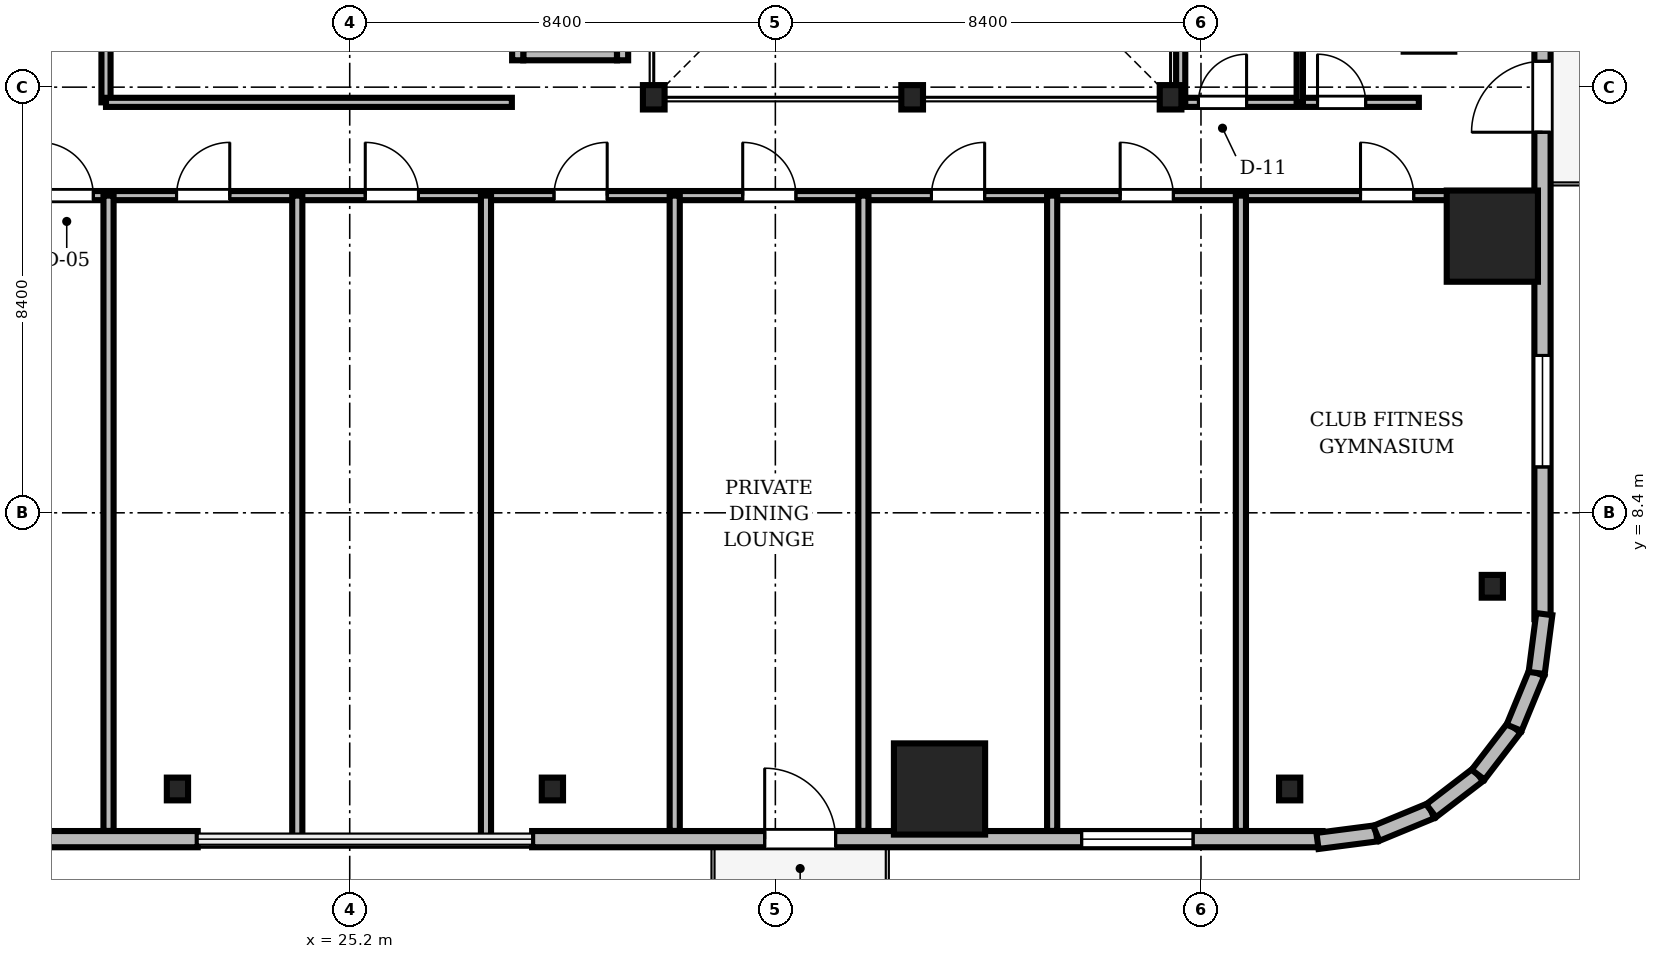
"""IFC4 building model, lengths in metres.
Left out: names, types, materials, properties, quantities, classifications, styles, units other than length and angle.
Written with IfcOpenShell. Run it as: python <this file> out.ifc"""

import sys

from ifc_helpers import new_model, si_unit, direction, frame, frame_2d, origin, origin_2d, place, context, subcontext, project, spatial, rectangle, i_section, extrude, source, transform, mapped, element, fill, save


model = new_model("IFC4")
c1 = context("Model", 3, precision=1e-05, world=origin(), true_north=direction((0.0, 1.0)))
c2 = subcontext(c1, "Body", "Model", "MODEL_VIEW")
j1 = project(units=[si_unit("LENGTHUNIT", "METRE"), si_unit("PLANEANGLEUNIT", "RADIAN")], contexts=[c1])
p1 = place(None, origin())
s1 = spatial("IfcSite", under=j1, at=p1, CompositionType="ELEMENT")
p2 = place(p1, origin())
s2 = spatial("IfcBuilding", under=s1, at=p2, CompositionType="ELEMENT")
p3 = place(p2, frame((0.0, 0.0, 89.65)))
s3 = spatial("IfcBuildingStorey", under=s2, at=p3, CompositionType="ELEMENT", Elevation=89.65)
m1 = source(origin(), c2, "Body", "SweptSolid", [
    extrude(i_section(OverallWidth=0.428, OverallDepth=0.481, WebThickness=0.04, FlangeThickness=0.063, FilletRadius=0.015, at=origin_2d()), origin(), (0.0, 0.0, 1.0), 3.0),
])
for number, where, z_axis, x_axis in (
    (1, (31.2, 16.6, 0.0), (0.0, 0.0, 1.0), (1.0, 0.0, 0.0)),
    (2, (36.3, 16.6, 0.0), (0.0, 0.0, 1.0), (1.0, 0.0, 0.0)),
    (3, (41.4, 16.6, 0.0), (0.0, 0.0, 1.0), (1.0, 0.0, 0.0)),
):
    element("IfcColumn", number, at=place(p3, frame(where, z_axis=z_axis, x_axis=x_axis)), inside=s3, PredefinedType="COLUMN", context=c2, shape_type="MappedRepresentation", body=[
        mapped(m1, transform((0.0, 0.0, 0.0), scale=1.0)),
    ])
m2 = source(origin(), c2, "Body", "SweptSolid", [
    extrude(rectangle(XDim=1.8, YDim=1.8, at=origin_2d()), origin(), (0.0, 0.0, 1.0), 3.0),
])
for number, where, z_axis, x_axis in (
    (4, (36.84, 2.95, 0.0), (0.0, 0.0, 1.0), (1.0, 0.0, 0.0)),
    (5, (47.75, 13.86, 0.0), (0.0, 0.0, 1.0), (1.0, 0.0, 0.0)),
):
    element("IfcColumn", number, at=place(p3, frame(where, z_axis=z_axis, x_axis=x_axis)), inside=s3, PredefinedType="COLUMN", context=c2, shape_type="MappedRepresentation", body=[
        mapped(m2, transform((0.0, 0.0, 0.0), scale=1.0)),
    ])
m3 = source(origin(), c2, "Body", "SweptSolid", [
    extrude(i_section(OverallWidth=0.419, OverallDepth=0.449, WebThickness=0.031, FlangeThickness=0.048, FilletRadius=0.015, at=origin_2d()), origin(), (0.0, 0.0, 1.0), 3.0),
])
for number, where, z_axis, x_axis in (
    (6, (21.8, 2.95, 0.0), (0.0, 0.0, 1.0), (1.0, 0.0, 0.0)),
    (7, (29.2, 2.95, 0.0), (0.0, 0.0, 1.0), (1.0, 0.0, 0.0)),
    (8, (43.75, 2.95, 0.0), (0.0, 0.0, 1.0), (1.0, 0.0, 0.0)),
    (9, (47.75, 6.95, 0.0), (0.0, 0.0, 1.0), (1.0, 0.0, 0.0)),
):
    element("IfcColumn", number, at=place(p3, frame(where, z_axis=z_axis, x_axis=x_axis)), inside=s3, PredefinedType="COLUMN", context=c2, shape_type="MappedRepresentation", body=[
        mapped(m3, transform((0.0, 0.0, 0.0), scale=1.0)),
    ])
m4 = source(origin(), c2, "Body", "SweptSolid", [
    extrude(rectangle(XDim=15.6, YDim=0.32, at=frame_2d((7.8, 0.0))), origin(), (0.0, 0.0, 1.0), 3.0),
])
p4 = place(p3, frame((6.6, 1.96, 0.0), z_axis=(0.0, 0.0, 1.0), x_axis=(1.0, 0.0, 0.0)))
e10 = element("IfcWall", 10, at=p4, inside=s3, PredefinedType="SOLIDWALL", context=c2, shape_type="MappedRepresentation", body=[
    mapped(m4, transform((0.0, 0.0, 0.0), scale=1.0)),
])
m5 = source(origin(), c2, "Body", "SweptSolid", [
    extrude(rectangle(XDim=2.2, YDim=2.4, at=frame_2d((1.1, 1.2))), frame((0.0, 0.17, 0.0), z_axis=(0.0, -1.0, 0.0), x_axis=(1.0, 0.0, 0.0)), (0.0, 0.0, 1.0), 0.34),
])
p5 = place(p4, frame((3.005, 0.0, 0.35)))
e11 = element("IfcOpeningElement", 11, at=p5, cuts=e10, PredefinedType="OPENING", context=c2, shape_type="MappedRepresentation", body=[
    mapped(m5, transform((0.0, 0.0, 0.0), scale=1.0)),
])
p6 = place(p3, frame((28.8, 1.96, 0.0), z_axis=(0.0, 0.0, 1.0), x_axis=(1.0, 0.0, 0.0)))
e12 = element("IfcWall", 12, at=p6, inside=s3, PredefinedType="SOLIDWALL", context=c2, shape_type="MappedRepresentation", body=[
    mapped(m4, transform((0.0, 0.0, 0.0), scale=1.0)),
])
m6 = source(origin(), c2, "Body", "SweptSolid", [
    extrude(rectangle(XDim=1.4, YDim=2.3, at=frame_2d((0.7, 1.15))), frame((0.0, 0.17, 0.0), z_axis=(0.0, -1.0, 0.0), x_axis=(1.0, 0.0, 0.0)), (0.0, 0.0, 1.0), 0.34),
])
p7 = place(p6, frame((4.59, 0.0, 0.0)))
e13 = element("IfcOpeningElement", 13, at=p7, cuts=e12, PredefinedType="OPENING", context=c2, shape_type="MappedRepresentation", body=[
    mapped(m6, transform((0.0, 0.0, 0.0), scale=1.0)),
])
p8 = place(p6, frame((10.845, 0.0, 0.35)))
e14 = element("IfcOpeningElement", 14, at=p8, cuts=e12, PredefinedType="OPENING", context=c2, shape_type="MappedRepresentation", body=[
    mapped(m5, transform((0.0, 0.0, 0.0), scale=1.0)),
])
p9 = place(p3, frame((48.74, 6.3, 0.0), z_axis=(0.0, 0.0, 1.0), x_axis=(0.0, 1.0, 0.0)))
e15 = element("IfcWall", 15, at=p9, inside=s3, PredefinedType="SOLIDWALL", context=c2, shape_type="MappedRepresentation", body=[
    mapped(m4, transform((0.0, 0.0, 0.0), scale=1.0)),
])
p10 = place(p9, frame((9.61, 0.0, 0.0)))
e16 = element("IfcOpeningElement", 16, at=p10, cuts=e15, PredefinedType="OPENING", context=c2, shape_type="MappedRepresentation", body=[
    mapped(m6, transform((0.0, 0.0, 0.0), scale=1.0)),
])
p11 = place(p9, frame((3.005, 0.0, 0.35)))
e17 = element("IfcOpeningElement", 17, at=p11, cuts=e15, PredefinedType="OPENING", context=c2, shape_type="MappedRepresentation", body=[
    mapped(m5, transform((0.0, 0.0, 0.0), scale=1.0)),
])
m7 = source(origin(), c2, "Body", "SweptSolid", [
    extrude(rectangle(XDim=1.17, YDim=0.32, at=frame_2d((0.585, 0.0))), origin(), (0.0, 0.0, 1.0), 3.0),
])
p12 = place(p3, frame((44.3, 1.925, 0.0), z_axis=(0.0, 0.0, 1.0), x_axis=(0.991762485493, 0.128090485085, 0.0)))
e18 = element("IfcWall", 18, at=p12, inside=s3, PredefinedType="SOLIDWALL", context=c2, shape_type="MappedRepresentation", body=[
    mapped(m7, transform((0.0, 0.0, 0.0), scale=1.0)),
])
m8 = source(origin(), c2, "Body", "SweptSolid", [
    extrude(rectangle(XDim=1.169, YDim=0.32, at=frame_2d((0.585, 0.0))), origin(), (0.0, 0.0, 1.0), 3.0),
])
p13 = place(p3, frame((45.46, 2.074, 0.0), z_axis=(0.0, 0.0, 1.0), x_axis=(0.924479075121, 0.381232789334, 0.0)))
e19 = element("IfcWall", 19, at=p13, inside=s3, PredefinedType="SOLIDWALL", context=c2, shape_type="MappedRepresentation", body=[
    mapped(m8, transform((0.0, 0.0, 0.0), scale=1.0)),
])
m9 = source(origin(), c2, "Body", "SweptSolid", [
    extrude(rectangle(XDim=1.169, YDim=0.32, at=frame_2d((0.584, 0.0))), origin(), (0.0, 0.0, 1.0), 3.0),
])
p14 = place(p3, frame((46.541, 2.52, 0.0), z_axis=(0.0, 0.0, 1.0), x_axis=(0.793663520347, 0.608356981114, 0.0)))
e20 = element("IfcWall", 20, at=p14, inside=s3, PredefinedType="SOLIDWALL", context=c2, shape_type="MappedRepresentation", body=[
    mapped(m9, transform((0.0, 0.0, 0.0), scale=1.0)),
])
m10 = source(origin(), c2, "Body", "SweptSolid", [
    extrude(rectangle(XDim=1.169, YDim=0.32, at=frame_2d((0.584, 0.0))), origin(), (0.0, 0.0, 1.0), 3.0),
])
for number, where, z_axis, x_axis in (
    (21, (47.469, 3.231, 0.0), (0.0, 0.0, 1.0), (0.608, 0.794, 0.0)),
    (22, (48.18, 4.159, 0.0), (0.0, 0.0, 1.0), (0.381, 0.925, 0.0)),
):
    element("IfcWall", number, at=place(p3, frame(where, z_axis=z_axis, x_axis=x_axis)), inside=s3, PredefinedType="SOLIDWALL", context=c2, shape_type="MappedRepresentation", body=[
        mapped(m10, transform((0.0, 0.0, 0.0), scale=1.0)),
    ])
m11 = source(origin(), c2, "Body", "SweptSolid", [
    extrude(rectangle(XDim=1.171, YDim=0.32, at=frame_2d((0.585, 0.0))), origin(), (0.0, 0.0, 1.0), 3.0),
])
p15 = place(p3, frame((48.625, 5.24, 0.0), z_axis=(0.0, 0.0, 1.0), x_axis=(0.128269133229, 0.991739395941, 0.0)))
e23 = element("IfcWall", 23, at=p15, inside=s3, PredefinedType="SOLIDWALL", context=c2, shape_type="MappedRepresentation", body=[
    mapped(m11, transform((0.0, 0.0, 0.0), scale=1.0)),
])
m12 = source(origin(), c2, "Body", "SweptSolid", [
    extrude(rectangle(XDim=1.85, YDim=0.22, at=frame_2d((0.925, 0.0))), origin(), (0.0, 0.0, 1.0), 3.0),
])
p16 = place(p3, frame((28.625, 17.44, 0.0), z_axis=(0.0, 0.0, 1.0), x_axis=(1.0, 0.0, 0.0)))
e24 = element("IfcWall", 24, at=p16, inside=s3, PredefinedType="SOLIDWALL", context=c2, shape_type="MappedRepresentation", body=[
    mapped(m12, transform((0.0, 0.0, 0.0), scale=1.0)),
])
m13 = source(origin(), c2, "Body", "SweptSolid", [
    extrude(rectangle(XDim=2.54, YDim=0.22, at=frame_2d((1.27, 0.0))), origin(), (0.0, 0.0, 1.0), 3.0),
])
for number, where, z_axis, x_axis in (
    (25, (28.515, 17.33, 0.0), (0.0, 0.0, 1.0), (0.0, 1.0, 0.0)),
    (26, (30.585, 17.33, 0.0), (0.0, 0.0, 1.0), (0.0, 1.0, 0.0)),
):
    element("IfcWall", number, at=place(p3, frame(where, z_axis=z_axis, x_axis=x_axis)), inside=s3, PredefinedType="SOLIDWALL", context=c2, shape_type="MappedRepresentation", body=[
        mapped(m13, transform((0.0, 0.0, 0.0), scale=1.0)),
    ])
m14 = source(origin(), c2, "Body", "SweptSolid", [
    extrude(rectangle(XDim=46.156, YDim=0.18, at=frame_2d((23.078, 0.0))), origin(), (0.0, 0.0, 1.0), 2.276),
])
p17 = place(p3, frame((2.422, 14.66, 0.0), z_axis=(0.0, 0.0, 1.0), x_axis=(1.0, 0.0, 0.0)))
e27 = element("IfcWall", 27, at=p17, inside=s3, PredefinedType="PARTITIONING", context=c2, shape_type="MappedRepresentation", body=[
    mapped(m14, transform((0.0, 0.0, 0.0), scale=1.0)),
])
m15 = source(origin(), c2, "Body", "SweptSolid", [
    extrude(rectangle(XDim=1.05, YDim=2.2, at=frame_2d((0.525, 1.1))), frame((0.0, 0.1, 0.0), z_axis=(0.0, -1.0, 0.0), x_axis=(1.0, 0.0, 0.0)), (0.0, 0.0, 1.0), 0.2),
])
p18 = place(p17, frame((16.668, 0.0, 0.0)))
e28 = element("IfcOpeningElement", 28, at=p18, cuts=e27, PredefinedType="OPENING", context=c2, shape_type="MappedRepresentation", body=[
    mapped(m15, transform((0.0, 0.0, 0.0), scale=1.0)),
])
p19 = place(p17, frame((19.36, 0.0, 0.0)))
e29 = element("IfcOpeningElement", 29, at=p19, cuts=e27, PredefinedType="OPENING", context=c2, shape_type="MappedRepresentation", body=[
    mapped(m15, transform((0.0, 0.0, 0.0), scale=1.0)),
])
p20 = place(p17, frame((23.085, 0.0, 0.0)))
e30 = element("IfcOpeningElement", 30, at=p20, cuts=e27, PredefinedType="OPENING", context=c2, shape_type="MappedRepresentation", body=[
    mapped(m15, transform((0.0, 0.0, 0.0), scale=1.0)),
])
p21 = place(p17, frame((26.809, 0.0, 0.0)))
e31 = element("IfcOpeningElement", 31, at=p21, cuts=e27, PredefinedType="OPENING", context=c2, shape_type="MappedRepresentation", body=[
    mapped(m15, transform((0.0, 0.0, 0.0), scale=1.0)),
])
p22 = place(p17, frame((30.534, 0.0, 0.0)))
e32 = element("IfcOpeningElement", 32, at=p22, cuts=e27, PredefinedType="OPENING", context=c2, shape_type="MappedRepresentation", body=[
    mapped(m15, transform((0.0, 0.0, 0.0), scale=1.0)),
])
p23 = place(p17, frame((34.259, 0.0, 0.0)))
e33 = element("IfcOpeningElement", 33, at=p23, cuts=e27, PredefinedType="OPENING", context=c2, shape_type="MappedRepresentation", body=[
    mapped(m15, transform((0.0, 0.0, 0.0), scale=1.0)),
])
p24 = place(p17, frame((37.983, 0.0, 0.0)))
e34 = element("IfcOpeningElement", 34, at=p24, cuts=e27, PredefinedType="OPENING", context=c2, shape_type="MappedRepresentation", body=[
    mapped(m15, transform((0.0, 0.0, 0.0), scale=1.0)),
])
p25 = place(p17, frame((42.727, 0.0, 0.0)))
e35 = element("IfcOpeningElement", 35, at=p25, cuts=e27, PredefinedType="OPENING", context=c2, shape_type="MappedRepresentation", body=[
    mapped(m15, transform((0.0, 0.0, 0.0), scale=1.0)),
])
m16 = source(origin(), c2, "Body", "SweptSolid", [
    extrude(rectangle(XDim=4.7, YDim=0.18, at=frame_2d((2.35, 0.0))), origin(), (0.0, 0.0, 1.0), 2.442),
])
p26 = place(p3, frame((41.6, 16.5, 0.0), z_axis=(0.0, 0.0, 1.0), x_axis=(1.0, 0.0, 0.0)))
e36 = element("IfcWall", 36, at=p26, inside=s3, PredefinedType="PARTITIONING", context=c2, shape_type="MappedRepresentation", body=[
    mapped(m16, transform((0.0, 0.0, 0.0), scale=1.0)),
])
m17 = source(origin(), c2, "Body", "SweptSolid", [
    extrude(rectangle(XDim=0.95, YDim=2.15, at=frame_2d((0.475, 1.075))), frame((0.0, 0.1, 0.0), z_axis=(0.0, -1.0, 0.0), x_axis=(1.0, 0.0, 0.0)), (0.0, 0.0, 1.0), 0.2),
])
p27 = place(p26, frame((0.35, 0.0, 0.0)))
e37 = element("IfcOpeningElement", 37, at=p27, cuts=e36, PredefinedType="OPENING", context=c2, shape_type="MappedRepresentation", body=[
    mapped(m17, transform((0.0, 0.0, 0.0), scale=1.0)),
])
p28 = place(p26, frame((2.7, 0.0, 0.0)))
e38 = element("IfcOpeningElement", 38, at=p28, cuts=e36, PredefinedType="OPENING", context=c2, shape_type="MappedRepresentation", body=[
    mapped(m17, transform((0.0, 0.0, 0.0), scale=1.0)),
])
m18 = source(origin(), c2, "Body", "SweptSolid", [
    extrude(rectangle(XDim=3.55, YDim=0.18, at=frame_2d((1.775, 0.0))), origin(), (0.0, 0.0, 1.0), 2.442),
])
p29 = place(p3, frame((20.39, 16.5, 0.0), z_axis=(0.0, 0.0, 1.0), x_axis=(0.0, 1.0, 0.0)))
e39 = element("IfcWall", 39, at=p29, inside=s3, PredefinedType="PARTITIONING", context=c2, shape_type="MappedRepresentation", body=[
    mapped(m18, transform((0.0, 0.0, 0.0), scale=1.0)),
])
p30 = place(p29, frame((1.15, 0.0, 0.0)))
e40 = element("IfcOpeningElement", 40, at=p30, cuts=e39, PredefinedType="OPENING", context=c2, shape_type="MappedRepresentation", body=[
    mapped(m15, transform((0.0, 0.0, 0.0), scale=1.0)),
])
m19 = source(origin(), c2, "Body", "SweptSolid", [
    extrude(rectangle(XDim=12.538, YDim=0.2, at=frame_2d((6.269, 0.0))), origin(), (0.0, 0.0, 1.0), 2.276),
])
p31 = place(p3, frame((20.44, 2.122, 0.0), z_axis=(0.0, 0.0, 1.0), x_axis=(0.0, 1.0, 0.0)))
e41 = element("IfcWall", 41, at=p31, inside=s3, PredefinedType="PARTITIONING", context=c2, shape_type="MappedRepresentation", body=[
    mapped(m19, transform((0.0, 0.0, 0.0), scale=1.0)),
])
m20 = source(origin(), c2, "Body", "SweptSolid", [
    extrude(rectangle(XDim=12.73, YDim=0.2, at=frame_2d((6.365, 0.0))), origin(), (0.0, 0.0, 1.0), 2.276),
])
for number, where, z_axis, x_axis in (
    (42, (24.165, 1.93, 0.0), (0.0, 0.0, 1.0), (0.0, 1.0, 0.0)),
    (43, (27.889, 1.93, 0.0), (0.0, 0.0, 1.0), (0.0, 1.0, 0.0)),
):
    element("IfcWall", number, at=place(p3, frame(where, z_axis=z_axis, x_axis=x_axis)), inside=s3, PredefinedType="PARTITIONING", context=c2, shape_type="MappedRepresentation", body=[
        mapped(m20, transform((0.0, 0.0, 0.0), scale=1.0)),
    ])
for number, where, z_axis, x_axis in (
    (44, (31.614, 2.122, 0.0), (0.0, 0.0, 1.0), (0.0, 1.0, 0.0)),
    (45, (35.338, 2.122, 0.0), (0.0, 0.0, 1.0), (0.0, 1.0, 0.0)),
    (46, (39.063, 2.122, 0.0), (0.0, 0.0, 1.0), (0.0, 1.0, 0.0)),
    (47, (42.788, 2.122, 0.0), (0.0, 0.0, 1.0), (0.0, 1.0, 0.0)),
):
    element("IfcWall", number, at=place(p3, frame(where, z_axis=z_axis, x_axis=x_axis)), inside=s3, PredefinedType="PARTITIONING", context=c2, shape_type="MappedRepresentation", body=[
        mapped(m19, transform((0.0, 0.0, 0.0), scale=1.0)),
    ])
m21 = source(origin(), c2, "Body", "SweptSolid", [
    extrude(rectangle(XDim=8.01, YDim=0.18, at=frame_2d((4.005, 0.0))), origin(), (0.0, 0.0, 1.0), 2.442),
])
p32 = place(p3, frame((20.39, 16.5, 0.0), z_axis=(0.0, 0.0, 1.0), x_axis=(1.0, 0.0, 0.0)))
e48 = element("IfcWall", 48, at=p32, inside=s3, PredefinedType="PARTITIONING", context=c2, shape_type="MappedRepresentation", body=[
    mapped(m21, transform((0.0, 0.0, 0.0), scale=1.0)),
])
m22 = source(origin(), c2, "Body", "SweptSolid", [
    extrude(rectangle(XDim=7.15, YDim=0.18, at=frame_2d((3.575, 0.0))), origin(), (0.0, 0.0, 1.0), 2.442),
])
p33 = place(p3, frame((41.6, 16.5, 0.0), z_axis=(0.0, 0.0, 1.0), x_axis=(0.0, 1.0, 0.0)))
e49 = element("IfcWall", 49, at=p33, inside=s3, PredefinedType="PARTITIONING", context=c2, shape_type="MappedRepresentation", body=[
    mapped(m22, transform((0.0, 0.0, 0.0), scale=1.0)),
])
m23 = source(origin(), c2, "Body", "SweptSolid", [
    extrude(rectangle(XDim=7.15, YDim=0.125, at=frame_2d((3.575, 0.0))), origin(), (0.0, 0.0, 1.0), 2.442),
])
p34 = place(p3, frame((43.95, 16.5, 0.0), z_axis=(0.0, 0.0, 1.0), x_axis=(0.0, 1.0, 0.0)))
e50 = element("IfcWall", 50, at=p34, inside=s3, PredefinedType="PARTITIONING", context=c2, shape_type="MappedRepresentation", body=[
    mapped(m23, transform((0.0, 0.0, 0.0), scale=1.0)),
])
m24 = source(origin(), c2, "Body", "SweptSolid", [
    extrude(rectangle(XDim=1.4, YDim=2.3, at=frame_2d((0.7, 1.15))), frame((0.0, 0.025, 0.0), z_axis=(0.0, -1.0, 0.0), x_axis=(1.0, 0.0, 0.0)), (0.0, 0.0, 1.0), 0.05),
])
p35 = place(p7, frame((1.4, 0.0, 0.0), z_axis=(0.0, 0.0, 1.0), x_axis=(-1.0, 0.0, 0.0)))
e51 = element("IfcDoor", 51, at=p35, inside=s3, OperationType="DOUBLE_DOOR_SLIDING", PredefinedType="DOOR", context=c2, shape_type="MappedRepresentation", body=[
    mapped(m24, transform((0.0, 0.0, 0.0), scale=1.0)),
])
fill(e13, e51)
m25 = source(origin(), c2, "Body", "SweptSolid", [
    extrude(rectangle(XDim=2.2, YDim=2.4, at=frame_2d((1.1, 1.2))), frame((0.0, 0.03, 0.0), z_axis=(0.0, -1.0, 0.0), x_axis=(1.0, 0.0, 0.0)), (0.0, 0.0, 1.0), 0.06),
])
p36 = place(p8, origin())
e52 = element("IfcWindow", 52, at=p36, inside=s3, PartitioningType="SINGLE_PANEL", PredefinedType="WINDOW", context=c2, shape_type="MappedRepresentation", body=[
    mapped(m25, transform((0.0, 0.0, 0.0), scale=1.0)),
])
fill(e14, e52)
p37 = place(p10, frame((1.4, 0.0, 0.0), z_axis=(0.0, 0.0, 1.0), x_axis=(-1.0, 0.0, 0.0)))
e53 = element("IfcDoor", 53, at=p37, inside=s3, OperationType="DOUBLE_DOOR_SLIDING", PredefinedType="DOOR", context=c2, shape_type="MappedRepresentation", body=[
    mapped(m24, transform((0.0, 0.0, 0.0), scale=1.0)),
])
fill(e16, e53)
p38 = place(p11, origin())
e54 = element("IfcWindow", 54, at=p38, inside=s3, PartitioningType="SINGLE_PANEL", PredefinedType="WINDOW", context=c2, shape_type="MappedRepresentation", body=[
    mapped(m25, transform((0.0, 0.0, 0.0), scale=1.0)),
])
fill(e17, e54)
m26 = source(origin(), c2, "Body", "SweptSolid", [
    extrude(rectangle(XDim=1.05, YDim=2.2, at=frame_2d((0.525, 1.1))), frame((0.0, 0.025, 0.0), z_axis=(0.0, -1.0, 0.0), x_axis=(1.0, 0.0, 0.0)), (0.0, 0.0, 1.0), 0.05),
])
p39 = place(p18, origin())
e55 = element("IfcDoor", 55, at=p39, inside=s3, OperationType="SINGLE_SWING_LEFT", PredefinedType="DOOR", context=c2, shape_type="MappedRepresentation", body=[
    mapped(m26, transform((0.0, 0.0, 0.0), scale=1.0)),
])
fill(e28, e55)
p40 = place(p19, origin())
e56 = element("IfcDoor", 56, at=p40, inside=s3, OperationType="SINGLE_SWING_RIGHT", PredefinedType="DOOR", context=c2, shape_type="MappedRepresentation", body=[
    mapped(m26, transform((0.0, 0.0, 0.0), scale=1.0)),
])
fill(e29, e56)
p41 = place(p20, origin())
e57 = element("IfcDoor", 57, at=p41, inside=s3, OperationType="SINGLE_SWING_LEFT", PredefinedType="DOOR", context=c2, shape_type="MappedRepresentation", body=[
    mapped(m26, transform((0.0, 0.0, 0.0), scale=1.0)),
])
fill(e30, e57)
p42 = place(p21, origin())
e58 = element("IfcDoor", 58, at=p42, inside=s3, OperationType="SINGLE_SWING_RIGHT", PredefinedType="DOOR", context=c2, shape_type="MappedRepresentation", body=[
    mapped(m26, transform((0.0, 0.0, 0.0), scale=1.0)),
])
fill(e31, e58)
p43 = place(p22, origin())
e59 = element("IfcDoor", 59, at=p43, inside=s3, OperationType="SINGLE_SWING_LEFT", PredefinedType="DOOR", context=c2, shape_type="MappedRepresentation", body=[
    mapped(m26, transform((0.0, 0.0, 0.0), scale=1.0)),
])
fill(e32, e59)
p44 = place(p23, origin())
e60 = element("IfcDoor", 60, at=p44, inside=s3, OperationType="SINGLE_SWING_RIGHT", PredefinedType="DOOR", context=c2, shape_type="MappedRepresentation", body=[
    mapped(m26, transform((0.0, 0.0, 0.0), scale=1.0)),
])
fill(e33, e60)
p45 = place(p24, origin())
e61 = element("IfcDoor", 61, at=p45, inside=s3, OperationType="SINGLE_SWING_LEFT", PredefinedType="DOOR", context=c2, shape_type="MappedRepresentation", body=[
    mapped(m26, transform((0.0, 0.0, 0.0), scale=1.0)),
])
fill(e34, e61)
p46 = place(p25, origin())
e62 = element("IfcDoor", 62, at=p46, inside=s3, OperationType="SINGLE_SWING_LEFT", PredefinedType="DOOR", context=c2, shape_type="MappedRepresentation", body=[
    mapped(m26, transform((0.0, 0.0, 0.0), scale=1.0)),
])
fill(e35, e62)
m27 = source(origin(), c2, "Body", "SweptSolid", [
    extrude(rectangle(XDim=0.95, YDim=2.15, at=frame_2d((0.475, 1.075))), frame((0.0, 0.025, 0.0), z_axis=(0.0, -1.0, 0.0), x_axis=(1.0, 0.0, 0.0)), (0.0, 0.0, 1.0), 0.05),
])
p47 = place(p27, origin())
e63 = element("IfcDoor", 63, at=p47, inside=s3, OperationType="SINGLE_SWING_RIGHT", PredefinedType="DOOR", context=c2, shape_type="MappedRepresentation", body=[
    mapped(m27, transform((0.0, 0.0, 0.0), scale=1.0)),
])
fill(e37, e63)
p48 = place(p28, origin())
e64 = element("IfcDoor", 64, at=p48, inside=s3, OperationType="SINGLE_SWING_LEFT", PredefinedType="DOOR", context=c2, shape_type="MappedRepresentation", body=[
    mapped(m27, transform((0.0, 0.0, 0.0), scale=1.0)),
])
fill(e38, e64)
save(model, sys.argv[1])
